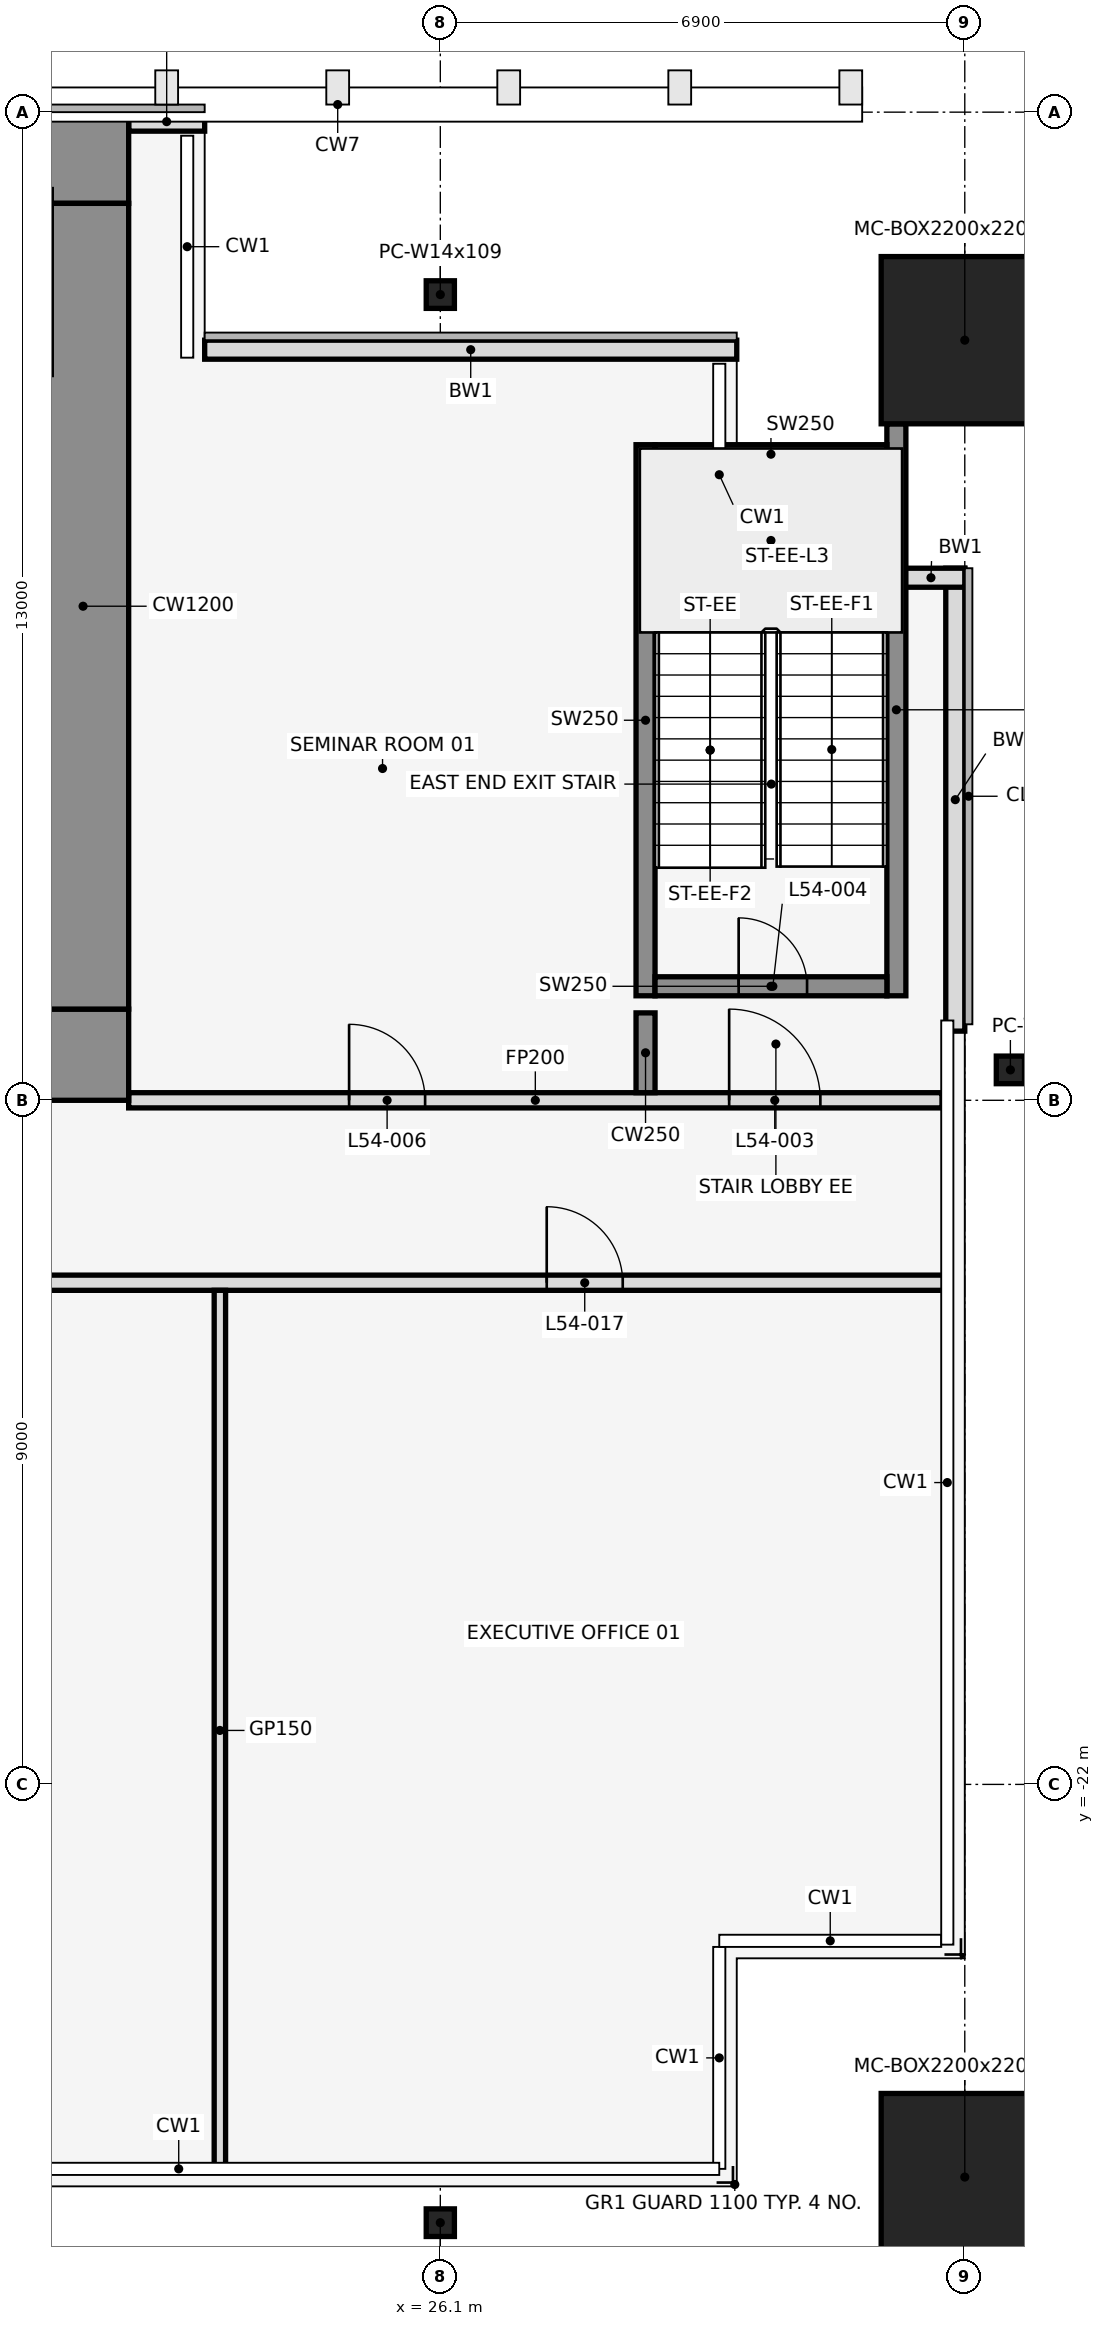
"""IFC4 building model, lengths in metres.
Left out: names, types, materials, properties, quantities, classifications, styles, units other than length and angle.
Written with IfcOpenShell. Run it as: python <this file> out.ifc"""

import sys

from ifc_helpers import new_model, si_unit, direction, frame, frame_2d, origin, origin_2d, place, context, subcontext, project, spatial, rectangle, hollow_rectangle, i_section, extrude, element, fill, save


model = new_model("IFC4")
c1 = context("Model", 3, precision=1e-05, world=origin(), true_north=direction((0.0, 1.0)))
c2 = subcontext(c1, "Body", "Model", "MODEL_VIEW")
j1 = project(units=[si_unit("LENGTHUNIT", "METRE"), si_unit("PLANEANGLEUNIT", "RADIAN")], contexts=[c1])
p1 = place(None, origin())
s1 = spatial("IfcSite", under=j1, at=p1, CompositionType="ELEMENT")
p2 = place(p1, origin())
s2 = spatial("IfcBuilding", under=s1, at=p2, CompositionType="ELEMENT")
p3 = place(p2, frame((0.0, 0.0, 241.4)))
s3 = spatial("IfcBuildingStorey", under=s2, at=p3, CompositionType="ELEMENT", Elevation=241.4)
for number, where, z_axis, x_axis in (
    (1, (26.1, -27.766, 0.0), (0.0, 0.0, 1.0), (1.0, 0.0, 0.0)),
    (2, (26.1, -2.4, 0.0), (0.0, 0.0, 1.0), (1.0, 0.0, 0.0)),
):
    element("IfcColumn", number, at=place(p3, frame(where, z_axis=z_axis, x_axis=x_axis)), inside=s3, PredefinedType="COLUMN", context=c2, shape_type="SweptSolid", body=[
        extrude(i_section(OverallWidth=0.371, OverallDepth=0.363, WebThickness=0.013, FlangeThickness=0.022, at=origin_2d()), origin(), (0.0, 0.0, 1.0), 4.2),
    ])
for number, where, z_axis, x_axis in (
    (3, (33.0, -27.166, 0.0), (0.0, 0.0, 1.0), (1.0, 0.0, 0.0)),
    (4, (33.0, -3.0, 0.0), (0.0, 0.0, 1.0), (1.0, 0.0, 0.0)),
):
    element("IfcColumn", number, at=place(p3, frame(where, z_axis=z_axis, x_axis=x_axis)), inside=s3, PredefinedType="COLUMN", context=c2, shape_type="SweptSolid", body=[
        extrude(hollow_rectangle(XDim=2.2, YDim=2.2, WallThickness=0.06, at=origin_2d()), origin(), (0.0, 0.0, 1.0), 4.2),
    ])
p4 = place(p3, frame((33.6, -12.6, 0.0), z_axis=(0.0, 0.0, 1.0), x_axis=(1.0, 0.0, 0.0)))
e5 = element("IfcColumn", 5, at=p4, inside=s3, PredefinedType="COLUMN", context=c2, shape_type="SweptSolid", body=[
    extrude(i_section(OverallWidth=0.371, OverallDepth=0.363, WebThickness=0.013, FlangeThickness=0.022, at=origin_2d()), origin(), (0.0, 0.0, 1.0), 4.2),
])
p5 = place(p3, frame((32.875, -12.09, 0.0), z_axis=(0.0, 0.0, 1.0), x_axis=(0.0, 1.0, 0.0)))
e6 = element("IfcWall", 6, at=p5, inside=s3, PredefinedType="STANDARD", context=c2, shape_type="SweptSolid", body=[
    extrude(rectangle(XDim=6.09, YDim=0.25, at=frame_2d((3.045, 0.0))), origin(), (0.0, 0.0, 1.0), 4.05),
])
p6 = place(p3, frame((33.0, -6.125, 0.0), z_axis=(0.0, 0.0, 1.0), x_axis=(-1.0, 0.0, 0.0)))
e7 = element("IfcWall", 7, at=p6, inside=s3, PredefinedType="STANDARD", context=c2, shape_type="SweptSolid", body=[
    extrude(rectangle(XDim=0.89, YDim=0.25, at=frame_2d((0.445, 0.0))), origin(), (0.0, 0.0, 1.0), 4.05),
])
p7 = place(p3, frame((30.0, -3.125, 0.0), z_axis=(0.0, 0.0, 1.0), x_axis=(-1.0, 0.0, 0.0)))
e8 = element("IfcWall", 8, at=p7, inside=s3, PredefinedType="STANDARD", context=c2, shape_type="SweptSolid", body=[
    extrude(rectangle(XDim=7.0, YDim=0.25, at=frame_2d((3.5, 0.0))), origin(), (0.0, 0.0, 1.0), 4.05),
])
p8 = place(p3, frame((23.0, -0.125, 0.0), z_axis=(0.0, 0.0, 1.0), x_axis=(-1.0, 0.0, 0.0)))
e9 = element("IfcWall", 9, at=p8, inside=s3, PredefinedType="STANDARD", context=c2, shape_type="SweptSolid", body=[
    extrude(rectangle(XDim=1.0, YDim=0.25, at=frame_2d((0.5, 0.0))), origin(), (0.0, 0.0, 1.0), 4.05),
])
p9 = place(p3, frame((28.8, -11.625, 0.0), z_axis=(0.0, 0.0, 1.0), x_axis=(0.0, 1.0, 0.0)))
e10 = element("IfcWall", 10, at=p9, inside=s3, PredefinedType="SHEAR", context=c2, shape_type="SweptSolid", body=[
    extrude(rectangle(XDim=7.25, YDim=0.25, at=frame_2d((3.625, 0.0))), origin(), (0.0, 0.0, 1.0), 4.2),
])
p10 = place(p3, frame((32.1, -11.625, 0.0), z_axis=(0.0, 0.0, 1.0), x_axis=(0.0, 1.0, 0.0)))
e11 = element("IfcWall", 11, at=p10, inside=s3, PredefinedType="SHEAR", context=c2, shape_type="SweptSolid", body=[
    extrude(rectangle(XDim=7.525, YDim=0.25, at=frame_2d((3.762, 0.0))), origin(), (0.0, 0.0, 1.0), 4.2),
])
p11 = place(p3, frame((28.925, -11.5, 0.0), z_axis=(0.0, 0.0, 1.0), x_axis=(1.0, 0.0, 0.0)))
e12 = element("IfcWall", 12, at=p11, inside=s3, PredefinedType="SHEAR", context=c2, shape_type="SweptSolid", body=[
    extrude(rectangle(XDim=3.05, YDim=0.25, at=frame_2d((1.525, 0.0))), origin(), (0.0, 0.0, 1.0), 4.2),
])
p12 = place(p11, frame((1.1, 0.0, 0.0)))
e13 = element("IfcOpeningElement", 13, at=p12, cuts=e12, PredefinedType="OPENING", context=c2, shape_type="SweptSolid", body=[
    extrude(rectangle(XDim=0.9, YDim=2.1, at=frame_2d((0.45, 1.05))), frame((0.0, 0.137, 0.0), z_axis=(0.0, -1.0, 0.0), x_axis=(1.0, 0.0, 0.0)), (0.0, 0.0, 1.0), 0.274),
])
p13 = place(p3, frame((28.925, -4.5, 0.0), z_axis=(0.0, 0.0, 1.0), x_axis=(1.0, 0.0, 0.0)))
e14 = element("IfcWall", 14, at=p13, inside=s3, PredefinedType="SHEAR", context=c2, shape_type="SweptSolid", body=[
    extrude(rectangle(XDim=3.05, YDim=0.25, at=frame_2d((1.525, 0.0))), origin(), (0.0, 0.0, 1.0), 4.2),
])
p14 = place(p3, frame((1.4, -15.4, 0.0), z_axis=(0.0, 0.0, 1.0), x_axis=(1.0, 0.0, 0.0)))
e15 = element("IfcWall", 15, at=p14, inside=s3, PredefinedType="PARTITIONING", context=c2, shape_type="SweptSolid", body=[
    extrude(rectangle(XDim=31.39, YDim=0.2, at=frame_2d((15.695, 0.0))), origin(), (0.0, 0.0, 1.0), 3.118),
])
p15 = place(p14, frame((3.2, 0.0, 0.0)))
e16 = element("IfcOpeningElement", 16, at=p15, cuts=e15, PredefinedType="OPENING", context=c2, shape_type="SweptSolid", body=[
    extrude(rectangle(XDim=1.0, YDim=2.1, at=frame_2d((0.5, 1.05))), frame((0.0, 0.112, 0.0), z_axis=(0.0, -1.0, 0.0), x_axis=(1.0, 0.0, 0.0)), (0.0, 0.0, 1.0), 0.224),
])
p16 = place(p14, frame((13.6, 0.0, 0.0)))
e17 = element("IfcOpeningElement", 17, at=p16, cuts=e15, PredefinedType="OPENING", context=c2, shape_type="SweptSolid", body=[
    extrude(rectangle(XDim=1.8, YDim=2.1, at=frame_2d((0.9, 1.05))), frame((0.0, 0.112, 0.0), z_axis=(0.0, -1.0, 0.0), x_axis=(1.0, 0.0, 0.0)), (0.0, 0.0, 1.0), 0.224),
])
p17 = place(p14, frame((26.1, 0.0, 0.0)))
e18 = element("IfcOpeningElement", 18, at=p17, cuts=e15, PredefinedType="OPENING", context=c2, shape_type="SweptSolid", body=[
    extrude(rectangle(XDim=1.0, YDim=2.1, at=frame_2d((0.5, 1.05))), frame((0.0, 0.112, 0.0), z_axis=(0.0, -1.0, 0.0), x_axis=(1.0, 0.0, 0.0)), (0.0, 0.0, 1.0), 0.224),
])
p18 = place(p3, frame((22.0, -13.0, 0.0), z_axis=(0.0, 0.0, 1.0), x_axis=(1.0, 0.0, 0.0)))
e19 = element("IfcWall", 19, at=p18, inside=s3, PredefinedType="PARTITIONING", context=c2, shape_type="SweptSolid", body=[
    extrude(rectangle(XDim=10.7, YDim=0.2, at=frame_2d((5.35, 0.0))), origin(), (0.0, 0.0, 1.0), 3.118),
])
p19 = place(p18, frame((7.9, 0.0, 0.0)))
e20 = element("IfcOpeningElement", 20, at=p19, cuts=e19, PredefinedType="OPENING", context=c2, shape_type="SweptSolid", body=[
    extrude(rectangle(XDim=1.2, YDim=2.1, at=frame_2d((0.6, 1.05))), frame((0.0, 0.112, 0.0), z_axis=(0.0, -1.0, 0.0), x_axis=(1.0, 0.0, 0.0)), (0.0, 0.0, 1.0), 0.224),
])
p20 = place(p18, frame((2.9, 0.0, 0.0)))
e21 = element("IfcOpeningElement", 21, at=p20, cuts=e19, PredefinedType="OPENING", context=c2, shape_type="SweptSolid", body=[
    extrude(rectangle(XDim=1.0, YDim=2.1, at=frame_2d((0.5, 1.05))), frame((0.0, 0.112, 0.0), z_axis=(0.0, -1.0, 0.0), x_axis=(1.0, 0.0, 0.0)), (0.0, 0.0, 1.0), 0.224),
])
p21 = place(p3, frame((23.2, -27.08, 0.0), z_axis=(0.0, 0.0, 1.0), x_axis=(0.0, 1.0, 0.0)))
e22 = element("IfcWall", 22, at=p21, inside=s3, PredefinedType="PARTITIONING", context=c2, shape_type="SweptSolid", body=[
    extrude(rectangle(XDim=11.58, YDim=0.15, at=frame_2d((5.79, 0.0))), origin(), (0.0, 0.0, 1.0), 3.118),
])
p22 = place(p3, frame((28.8, -12.9, 0.0), z_axis=(0.0, 0.0, 1.0), x_axis=(0.0, 1.0, 0.0)))
e23 = element("IfcWall", 23, at=p22, inside=s3, PredefinedType="SHEAR", context=c2, shape_type="SweptSolid", body=[
    extrude(rectangle(XDim=1.05, YDim=0.25, at=frame_2d((0.525, 0.0))), origin(), (0.0, 0.0, 1.0), 4.2),
])
p23 = place(p3, frame((-22.0, -0.6, 0.0), z_axis=(0.0, 0.0, 1.0), x_axis=(1.0, 0.0, 0.0)))
e24 = element("IfcWall", 24, at=p23, inside=s3, PredefinedType="SHEAR", context=c2, shape_type="SweptSolid", body=[
    extrude(rectangle(XDim=44.0, YDim=1.2, at=frame_2d((22.0, 0.0))), origin(), (0.0, 0.0, 1.0), 4.2),
])
p24 = place(p23, frame((18.55, 0.0, 0.0)))
e25 = element("IfcOpeningElement", 25, at=p24, cuts=e24, PredefinedType="OPENING", context=c2, shape_type="SweptSolid", body=[
    extrude(rectangle(XDim=0.9, YDim=2.1, at=frame_2d((0.45, 1.05))), frame((0.0, 0.612, 0.0), z_axis=(0.0, -1.0, 0.0), x_axis=(1.0, 0.0, 0.0)), (0.0, 0.0, 1.0), 1.224),
])
p25 = place(p23, frame((24.55, 0.0, 0.0)))
e26 = element("IfcOpeningElement", 26, at=p25, cuts=e24, PredefinedType="OPENING", context=c2, shape_type="SweptSolid", body=[
    extrude(rectangle(XDim=0.9, YDim=2.1, at=frame_2d((0.45, 1.05))), frame((0.0, 0.612, 0.0), z_axis=(0.0, -1.0, 0.0), x_axis=(1.0, 0.0, 0.0)), (0.0, 0.0, 1.0), 1.224),
])
p26 = place(p3, frame((-22.0, -12.4, 0.0), z_axis=(0.0, 0.0, 1.0), x_axis=(1.0, 0.0, 0.0)))
e27 = element("IfcWall", 27, at=p26, inside=s3, PredefinedType="SHEAR", context=c2, shape_type="SweptSolid", body=[
    extrude(rectangle(XDim=44.0, YDim=1.2, at=frame_2d((22.0, 0.0))), origin(), (0.0, 0.0, 1.0), 4.2),
])
p27 = place(p26, frame((2.2, 0.0, 0.0)))
e28 = element("IfcOpeningElement", 28, at=p27, cuts=e27, PredefinedType="OPENING", context=c2, shape_type="SweptSolid", body=[
    extrude(rectangle(XDim=1.2, YDim=2.1, at=frame_2d((0.6, 1.05))), frame((0.0, 0.612, 0.0), z_axis=(0.0, -1.0, 0.0), x_axis=(1.0, 0.0, 0.0)), (0.0, 0.0, 1.0), 1.224),
])
p28 = place(p26, frame((21.4, 0.0, 0.0)))
e29 = element("IfcOpeningElement", 29, at=p28, cuts=e27, PredefinedType="OPENING", context=c2, shape_type="SweptSolid", body=[
    extrude(rectangle(XDim=1.2, YDim=2.1, at=frame_2d((0.6, 1.05))), frame((0.0, 0.612, 0.0), z_axis=(0.0, -1.0, 0.0), x_axis=(1.0, 0.0, 0.0)), (0.0, 0.0, 1.0), 1.224),
])
p29 = place(p26, frame((40.6, 0.0, 0.0)))
e30 = element("IfcOpeningElement", 30, at=p29, cuts=e27, PredefinedType="OPENING", context=c2, shape_type="SweptSolid", body=[
    extrude(rectangle(XDim=1.2, YDim=2.1, at=frame_2d((0.6, 1.05))), frame((0.0, 0.612, 0.0), z_axis=(0.0, -1.0, 0.0), x_axis=(1.0, 0.0, 0.0)), (0.0, 0.0, 1.0), 1.224),
])
p30 = place(p26, frame((16.0, 0.0, 0.0)))
e31 = element("IfcOpeningElement", 31, at=p30, cuts=e27, PredefinedType="OPENING", context=c2, shape_type="SweptSolid", body=[
    extrude(rectangle(XDim=1.8, YDim=2.1, at=frame_2d((0.9, 1.05))), frame((0.0, 0.612, 0.0), z_axis=(0.0, -1.0, 0.0), x_axis=(1.0, 0.0, 0.0)), (0.0, 0.0, 1.0), 1.224),
])
p31 = place(p26, frame((6.3, 0.0, 0.0)))
e32 = element("IfcOpeningElement", 32, at=p31, cuts=e27, PredefinedType="OPENING", context=c2, shape_type="SweptSolid", body=[
    extrude(rectangle(XDim=1.2, YDim=2.1, at=frame_2d((0.6, 1.05))), frame((0.0, 0.612, 0.0), z_axis=(0.0, -1.0, 0.0), x_axis=(1.0, 0.0, 0.0)), (0.0, 0.0, 1.0), 1.224),
])
p32 = place(p26, frame((26.2, 0.0, 0.0)))
e33 = element("IfcOpeningElement", 33, at=p32, cuts=e27, PredefinedType="OPENING", context=c2, shape_type="SweptSolid", body=[
    extrude(rectangle(XDim=1.8, YDim=2.1, at=frame_2d((0.9, 1.05))), frame((0.0, 0.612, 0.0), z_axis=(0.0, -1.0, 0.0), x_axis=(1.0, 0.0, 0.0)), (0.0, 0.0, 1.0), 1.224),
])
p33 = place(p26, frame((36.5, 0.0, 0.0)))
e34 = element("IfcOpeningElement", 34, at=p33, cuts=e27, PredefinedType="OPENING", context=c2, shape_type="SweptSolid", body=[
    extrude(rectangle(XDim=1.2, YDim=2.1, at=frame_2d((0.6, 1.05))), frame((0.0, 0.612, 0.0), z_axis=(0.0, -1.0, 0.0), x_axis=(1.0, 0.0, 0.0)), (0.0, 0.0, 1.0), 1.224),
])
p34 = place(p3, frame((21.4, -11.8, 0.0), z_axis=(0.0, 0.0, 1.0), x_axis=(0.0, 1.0, 0.0)))
e35 = element("IfcWall", 35, at=p34, inside=s3, PredefinedType="SHEAR", context=c2, shape_type="SweptSolid", body=[
    extrude(rectangle(XDim=10.6, YDim=1.2, at=frame_2d((5.3, 0.0))), origin(), (0.0, 0.0, 1.0), 4.2),
])
p35 = place(p19, origin())
e36 = element("IfcDoor", 36, at=p35, inside=s3, OperationType="SINGLE_SWING_RIGHT", PredefinedType="DOOR", context=c2, shape_type="SweptSolid", body=[
    extrude(rectangle(XDim=1.2, YDim=2.1, at=frame_2d((0.6, 1.05))), frame((0.0, 0.025, 0.0), z_axis=(0.0, -1.0, 0.0), x_axis=(1.0, 0.0, 0.0)), (0.0, 0.0, 1.0), 0.05),
])
fill(e20, e36)
p36 = place(p12, origin())
e37 = element("IfcDoor", 37, at=p36, inside=s3, OperationType="SINGLE_SWING_LEFT", PredefinedType="DOOR", context=c2, shape_type="SweptSolid", body=[
    extrude(rectangle(XDim=0.9, YDim=2.1, at=frame_2d((0.45, 1.05))), frame((0.0, 0.025, 0.0), z_axis=(0.0, -1.0, 0.0), x_axis=(1.0, 0.0, 0.0)), (0.0, 0.0, 1.0), 0.05),
])
fill(e13, e37)
p37 = place(p20, origin())
e38 = element("IfcDoor", 38, at=p37, inside=s3, OperationType="SINGLE_SWING_RIGHT", PredefinedType="DOOR", context=c2, shape_type="SweptSolid", body=[
    extrude(rectangle(XDim=1.0, YDim=2.1, at=frame_2d((0.5, 1.05))), frame((0.0, 0.025, 0.0), z_axis=(0.0, -1.0, 0.0), x_axis=(1.0, 0.0, 0.0)), (0.0, 0.0, 1.0), 0.05),
])
fill(e21, e38)
p38 = place(p17, frame((1.0, 0.0, 0.0), z_axis=(0.0, 0.0, 1.0), x_axis=(-1.0, 0.0, 0.0)))
e39 = element("IfcDoor", 39, at=p38, inside=s3, OperationType="SINGLE_SWING_RIGHT", PredefinedType="DOOR", context=c2, shape_type="SweptSolid", body=[
    extrude(rectangle(XDim=1.0, YDim=2.1, at=frame_2d((0.5, 1.05))), frame((0.0, 0.025, 0.0), z_axis=(0.0, -1.0, 0.0), x_axis=(1.0, 0.0, 0.0)), (0.0, 0.0, 1.0), 0.05),
])
fill(e18, e39)
save(model, sys.argv[1])
